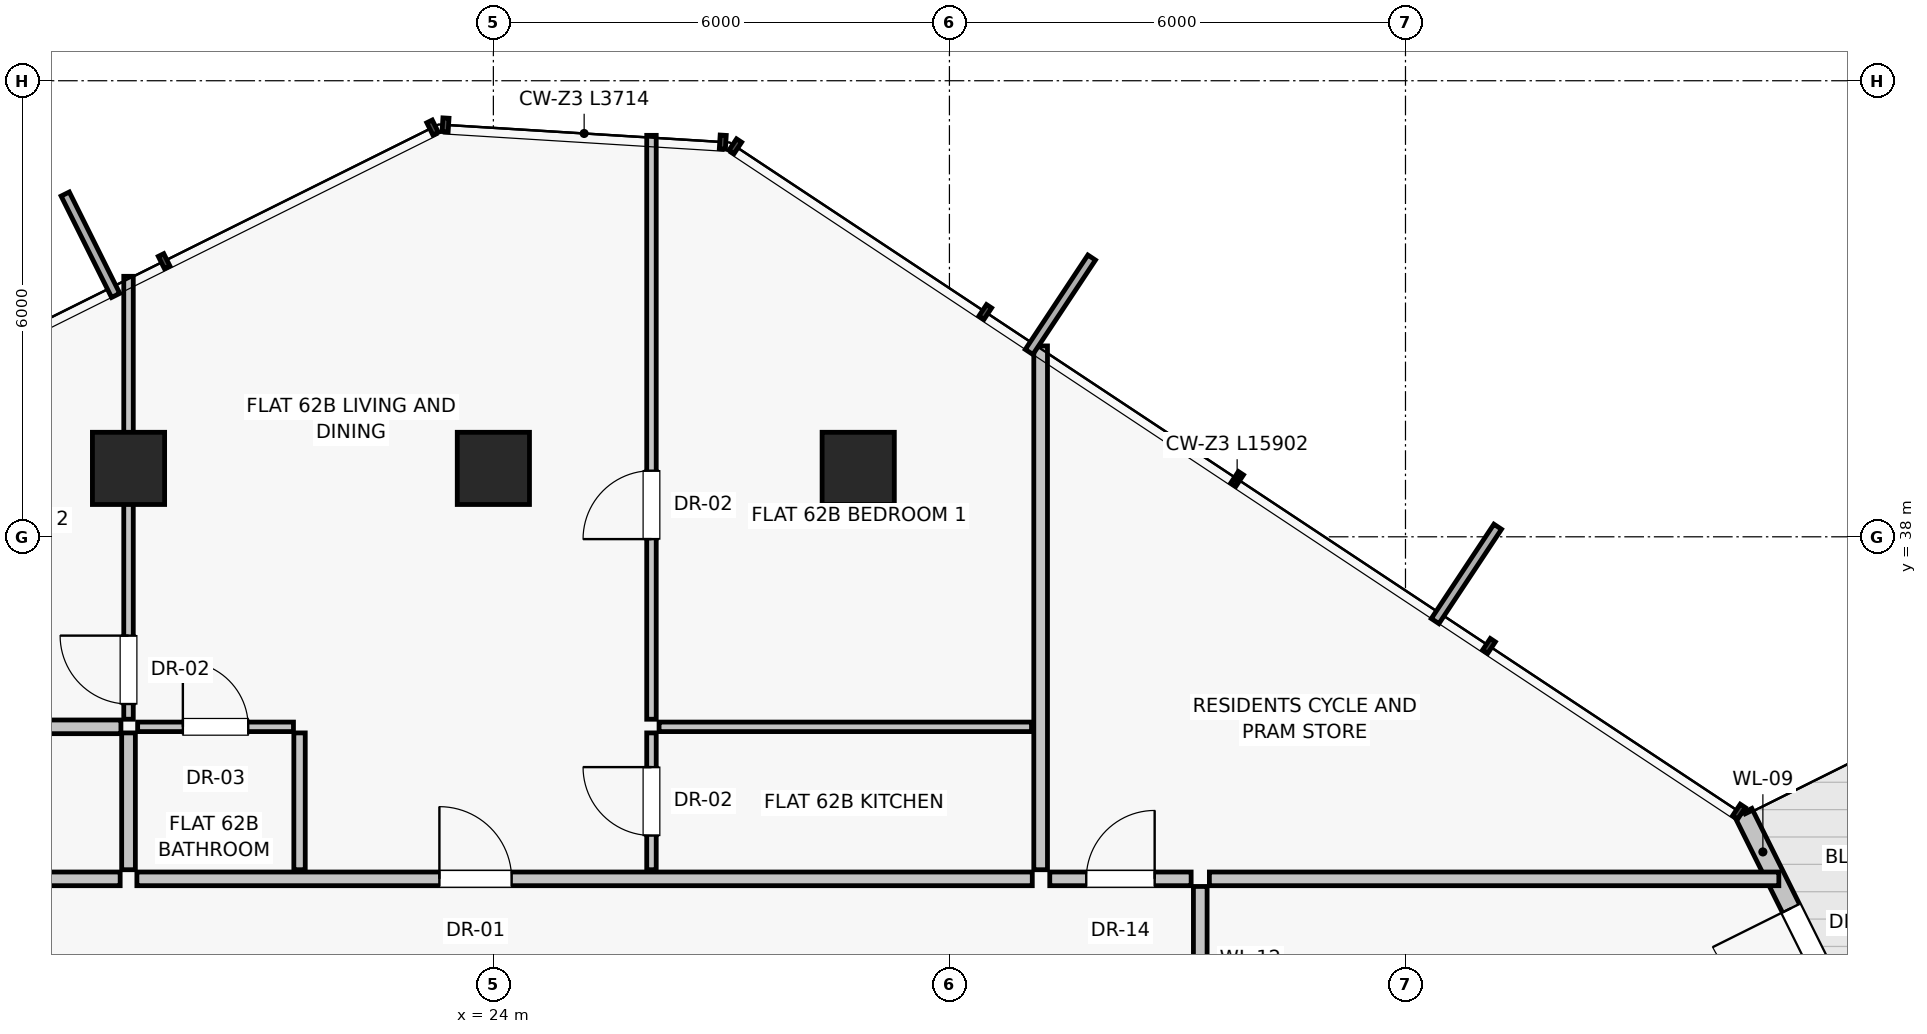
"""IFC4 building model, lengths in metres.
Left out: names, types, materials, properties, quantities, classifications, styles, units other than length and angle.
Written with IfcOpenShell. Run it as: python <this file> out.ifc"""

import sys

from ifc_helpers import new_model, si_unit, direction, frame, frame_2d, origin, origin_2d, place, context, subcontext, project, spatial, rectangle, extrude, source, transform, mapped, element, fill, save


model = new_model("IFC4")
c1 = context("Model", 3, precision=1e-05, world=origin(), true_north=direction((0.0, 1.0)))
c2 = subcontext(c1, "Body", "Model", "MODEL_VIEW")
j1 = project(units=[si_unit("LENGTHUNIT", "METRE"), si_unit("PLANEANGLEUNIT", "RADIAN")], contexts=[c1])
p1 = place(None, origin())
s1 = spatial("IfcSite", under=j1, at=p1, CompositionType="ELEMENT")
p2 = place(p1, origin())
s2 = spatial("IfcBuilding", under=s1, at=p2, CompositionType="ELEMENT")
p3 = place(p2, frame((0.0, 0.0, 218.9)))
s3 = spatial("IfcBuildingStorey", under=s2, at=p3, CompositionType="ELEMENT", Elevation=218.9)
for number, where, z_axis, x_axis in (
    (1, (28.8, 38.9, 0.0), (0.0, 0.0, 1.0), (1.0, 0.0, 0.0)),
    (2, (24.0, 38.9, 0.0), (0.0, 0.0, 1.0), (1.0, 0.0, 0.0)),
    (3, (19.2, 38.9, 0.0), (0.0, 0.0, 1.0), (1.0, 0.0, 0.0)),
):
    element("IfcColumn", number, at=place(p3, frame(where, z_axis=z_axis, x_axis=x_axis)), inside=s3, PredefinedType="COLUMN", context=c2, shape_type="SweptSolid", body=[
        extrude(rectangle(XDim=0.95, YDim=0.95, at=origin_2d()), origin(), (0.0, 0.0, 1.0), 3.25),
    ])
p4 = place(p3, frame((42.189, 30.867, 0.0), z_axis=(0.0, 0.0, 1.0), x_axis=(-0.445591168043, 0.895236567038, 0.0)))
e4 = element("IfcWall", 4, at=p4, inside=s3, PredefinedType="SOLIDWALL", context=c2, shape_type="SweptSolid", body=[
    extrude(rectangle(XDim=3.914, YDim=0.25, at=frame_2d((1.957, 0.0))), origin(), (0.0, 0.0, 1.0), 3.015),
])
p5 = place(p4, frame((1.36, 0.0, 0.0)))
e5 = element("IfcOpeningElement", 5, at=p5, cuts=e4, PredefinedType="OPENING", context=c2, shape_type="SweptSolid", body=[
    extrude(rectangle(XDim=1.15, YDim=2.25, at=frame_2d((0.575, 1.125))), frame((0.0, 0.135, 0.0), z_axis=(0.0, -1.0, 0.0), x_axis=(1.0, 0.0, 0.0)), (0.0, 0.0, 1.0), 0.27),
])
p6 = place(p3, frame((31.2, 33.62, 0.0), z_axis=(0.0, 0.0, 1.0), x_axis=(0.0, 1.0, 0.0)))
e6 = element("IfcWall", 6, at=p6, inside=s3, PredefinedType="PARTITIONING", context=c2, shape_type="SweptSolid", body=[
    extrude(rectangle(XDim=6.891, YDim=0.18, at=frame_2d((3.446, 0.0))), origin(), (0.0, 0.0, 1.0), 3.015),
])
p7 = place(p3, frame((15.31, 33.5, 0.0), z_axis=(0.0, 0.0, 1.0), x_axis=(1.0, 0.0, 0.0)))
e7 = element("IfcWall", 7, at=p7, inside=s3, PredefinedType="PARTITIONING", context=c2, shape_type="SweptSolid", body=[
    extrude(rectangle(XDim=3.78, YDim=0.18, at=frame_2d((1.89, 0.0))), origin(), (0.0, 0.0, 1.0), 3.015),
])
p8 = place(p7, frame((1.39, 0.0, 0.0)))
e8 = element("IfcOpeningElement", 8, at=p8, cuts=e7, PredefinedType="OPENING", context=c2, shape_type="SweptSolid", body=[
    extrude(rectangle(XDim=1.0, YDim=2.01, at=frame_2d((0.5, 1.005))), frame((0.0, 0.1, 0.0), z_axis=(0.0, -1.0, 0.0), x_axis=(1.0, 0.0, 0.0)), (0.0, 0.0, 1.0), 0.2),
])
p9 = place(p3, frame((19.31, 33.5, 0.0), z_axis=(0.0, 0.0, 1.0), x_axis=(1.0, 0.0, 0.0)))
e9 = element("IfcWall", 9, at=p9, inside=s3, PredefinedType="PARTITIONING", context=c2, shape_type="SweptSolid", body=[
    extrude(rectangle(XDim=11.78, YDim=0.18, at=frame_2d((5.89, 0.0))), origin(), (0.0, 0.0, 1.0), 3.015),
])
p10 = place(p9, frame((3.98, 0.0, 0.0)))
e10 = element("IfcOpeningElement", 10, at=p10, cuts=e9, PredefinedType="OPENING", context=c2, shape_type="SweptSolid", body=[
    extrude(rectangle(XDim=0.95, YDim=2.02, at=frame_2d((0.475, 1.01))), frame((0.0, 0.1, 0.0), z_axis=(0.0, -1.0, 0.0), x_axis=(1.0, 0.0, 0.0)), (0.0, 0.0, 1.0), 0.2),
])
p11 = place(p3, frame((15.32, 35.5, 0.0), z_axis=(0.0, 0.0, 1.0), x_axis=(1.0, 0.0, 0.0)))
e11 = element("IfcWall", 11, at=p11, inside=s3, PredefinedType="PARTITIONING", context=c2, shape_type="SweptSolid", body=[
    extrude(rectangle(XDim=3.78, YDim=0.18, at=frame_2d((1.89, 0.0))), origin(), (0.0, 0.0, 1.0), 3.015),
])
p12 = place(p3, frame((19.2, 33.62, 0.0), z_axis=(0.0, 0.0, 1.0), x_axis=(0.0, 1.0, 0.0)))
e12 = element("IfcWall", 12, at=p12, inside=s3, PredefinedType="PARTITIONING", context=c2, shape_type="SweptSolid", body=[
    extrude(rectangle(XDim=1.8, YDim=0.18, at=frame_2d((0.9, 0.0))), origin(), (0.0, 0.0, 1.0), 3.015),
])
p13 = place(p3, frame((19.2, 35.6, 0.0), z_axis=(0.0, 0.0, 1.0), x_axis=(0.0, 1.0, 0.0)))
e13 = element("IfcWall", 13, at=p13, inside=s3, PredefinedType="PARTITIONING", context=c2, shape_type="SweptSolid", body=[
    extrude(rectangle(XDim=5.827, YDim=0.125, at=frame_2d((2.914, 0.0))), origin(), (0.0, 0.0, 1.0), 2.469),
])
p14 = place(p13, frame((0.2, 0.0, 0.0)))
e14 = element("IfcOpeningElement", 14, at=p14, cuts=e13, PredefinedType="OPENING", context=c2, shape_type="SweptSolid", body=[
    extrude(rectangle(XDim=0.9, YDim=2.01, at=frame_2d((0.45, 1.005))), frame((0.0, 0.073, 0.0), z_axis=(0.0, -1.0, 0.0), x_axis=(1.0, 0.0, 0.0)), (0.0, 0.0, 1.0), 0.145),
])
p15 = place(p3, frame((21.45, 33.62, 0.0), z_axis=(0.0, 0.0, 1.0), x_axis=(0.0, 1.0, 0.0)))
e15 = element("IfcWall", 15, at=p15, inside=s3, PredefinedType="PARTITIONING", context=c2, shape_type="SweptSolid", body=[
    extrude(rectangle(XDim=1.8, YDim=0.15, at=frame_2d((0.9, 0.0))), origin(), (0.0, 0.0, 1.0), 3.015),
])
p16 = place(p3, frame((19.32, 35.5, 0.0), z_axis=(0.0, 0.0, 1.0), x_axis=(1.0, 0.0, 0.0)))
e16 = element("IfcWall", 16, at=p16, inside=s3, PredefinedType="PARTITIONING", context=c2, shape_type="SweptSolid", body=[
    extrude(rectangle(XDim=2.05, YDim=0.125, at=frame_2d((1.025, 0.0))), origin(), (0.0, 0.0, 1.0), 2.662),
])
p17 = place(p16, frame((0.595, 0.0, 0.0)))
e17 = element("IfcOpeningElement", 17, at=p17, cuts=e16, PredefinedType="OPENING", context=c2, shape_type="SweptSolid", body=[
    extrude(rectangle(XDim=0.86, YDim=2.01, at=frame_2d((0.43, 1.005))), frame((0.0, 0.073, 0.0), z_axis=(0.0, -1.0, 0.0), x_axis=(1.0, 0.0, 0.0)), (0.0, 0.0, 1.0), 0.145),
])
p18 = place(p3, frame((26.08, 33.62, 0.0), z_axis=(0.0, 0.0, 1.0), x_axis=(0.0, 1.0, 0.0)))
e18 = element("IfcWall", 18, at=p18, inside=s3, PredefinedType="PARTITIONING", context=c2, shape_type="SweptSolid", body=[
    extrude(rectangle(XDim=1.8, YDim=0.125, at=frame_2d((0.9, 0.0))), origin(), (0.0, 0.0, 1.0), 3.015),
])
p19 = place(p18, frame((0.45, 0.0, 0.0)))
e19 = element("IfcOpeningElement", 19, at=p19, cuts=e18, PredefinedType="OPENING", context=c2, shape_type="SweptSolid", body=[
    extrude(rectangle(XDim=0.9, YDim=2.01, at=frame_2d((0.45, 1.005))), frame((0.0, 0.073, 0.0), z_axis=(0.0, -1.0, 0.0), x_axis=(1.0, 0.0, 0.0)), (0.0, 0.0, 1.0), 0.145),
])
p20 = place(p3, frame((26.18, 35.5, 0.0), z_axis=(0.0, 0.0, 1.0), x_axis=(1.0, 0.0, 0.0)))
e20 = element("IfcWall", 20, at=p20, inside=s3, PredefinedType="PARTITIONING", context=c2, shape_type="SweptSolid", body=[
    extrude(rectangle(XDim=4.9, YDim=0.125, at=frame_2d((2.45, 0.0))), origin(), (0.0, 0.0, 1.0), 2.662),
])
p21 = place(p3, frame((26.08, 35.6, 0.0), z_axis=(0.0, 0.0, 1.0), x_axis=(0.0, 1.0, 0.0)))
e21 = element("IfcWall", 21, at=p21, inside=s3, PredefinedType="PARTITIONING", context=c2, shape_type="SweptSolid", body=[
    extrude(rectangle(XDim=7.681, YDim=0.125, at=frame_2d((3.841, 0.0))), origin(), (0.0, 0.0, 1.0), 3.015),
])
p22 = place(p21, frame((2.37, 0.0, 0.0)))
e22 = element("IfcOpeningElement", 22, at=p22, cuts=e21, PredefinedType="OPENING", context=c2, shape_type="SweptSolid", body=[
    extrude(rectangle(XDim=0.9, YDim=2.01, at=frame_2d((0.45, 1.005))), frame((0.0, 0.073, 0.0), z_axis=(0.0, -1.0, 0.0), x_axis=(1.0, 0.0, 0.0)), (0.0, 0.0, 1.0), 0.145),
])
p23 = place(p3, frame((33.3, 31.5, 0.0), z_axis=(0.0, 0.0, 1.0), x_axis=(0.0, 1.0, 0.0)))
e23 = element("IfcWall", 23, at=p23, inside=s3, PredefinedType="PARTITIONING", context=c2, shape_type="SweptSolid", body=[
    extrude(rectangle(XDim=1.9, YDim=0.18, at=frame_2d((0.95, 0.0))), origin(), (0.0, 0.0, 1.0), 3.015),
])
p24 = place(p3, frame((33.42, 33.5, 0.0), z_axis=(0.0, 0.0, 1.0), x_axis=(1.0, 0.0, 0.0)))
e24 = element("IfcWall", 24, at=p24, inside=s3, PredefinedType="PARTITIONING", context=c2, shape_type="SweptSolid", body=[
    extrude(rectangle(XDim=7.492, YDim=0.18, at=frame_2d((3.746, 0.0))), origin(), (0.0, 0.0, 1.0), 3.015),
])
p25 = place(p3, frame((31.32, 33.5, 0.0), z_axis=(0.0, 0.0, 1.0), x_axis=(1.0, 0.0, 0.0)))
e25 = element("IfcWall", 25, at=p25, inside=s3, PredefinedType="PARTITIONING", context=c2, shape_type="SweptSolid", body=[
    extrude(rectangle(XDim=1.86, YDim=0.18, at=frame_2d((0.93, 0.0))), origin(), (0.0, 0.0, 1.0), 3.015),
])
p26 = place(p25, frame((0.48, 0.0, 0.0)))
e26 = element("IfcOpeningElement", 26, at=p26, cuts=e25, PredefinedType="OPENING", context=c2, shape_type="SweptSolid", body=[
    extrude(rectangle(XDim=0.9, YDim=2.01, at=frame_2d((0.45, 1.005))), frame((0.0, 0.1, 0.0), z_axis=(0.0, -1.0, 0.0), x_axis=(1.0, 0.0, 0.0)), (0.0, 0.0, 1.0), 0.2),
])
m1 = source(origin(), c2, "Body", "SweptSolid", [
    extrude(rectangle(XDim=1.15, YDim=2.25, at=frame_2d((0.575, 1.125))), frame((0.0, 0.025, 0.0), z_axis=(0.0, -1.0, 0.0), x_axis=(1.0, 0.0, 0.0)), (0.0, 0.0, 1.0), 0.05),
])
p27 = place(p5, frame((1.15, 0.0, 0.0), z_axis=(0.0, 0.0, 1.0), x_axis=(-1.0, 0.0, 0.0)))
e27 = element("IfcDoor", 27, at=p27, inside=s3, OperationType="SINGLE_SWING_RIGHT", PredefinedType="DOOR", context=c2, shape_type="MappedRepresentation", body=[
    mapped(m1, transform((0.0, 0.0, 0.0), scale=1.0)),
])
fill(e5, e27)
m2 = source(origin(), c2, "Body", "SweptSolid", [
    extrude(rectangle(XDim=0.95, YDim=2.02, at=frame_2d((0.475, 1.01))), frame((0.0, 0.025, 0.0), z_axis=(0.0, -1.0, 0.0), x_axis=(1.0, 0.0, 0.0)), (0.0, 0.0, 1.0), 0.05),
])
p28 = place(p10, origin())
e28 = element("IfcDoor", 28, at=p28, inside=s3, OperationType="SINGLE_SWING_LEFT", PredefinedType="DOOR", context=c2, shape_type="MappedRepresentation", body=[
    mapped(m2, transform((0.0, 0.0, 0.0), scale=1.0)),
])
fill(e10, e28)
m3 = source(origin(), c2, "Body", "SweptSolid", [
    extrude(rectangle(XDim=0.9, YDim=2.01, at=frame_2d((0.45, 1.005))), frame((0.0, 0.025, 0.0), z_axis=(0.0, -1.0, 0.0), x_axis=(1.0, 0.0, 0.0)), (0.0, 0.0, 1.0), 0.05),
])
p29 = place(p14, origin())
e29 = element("IfcDoor", 29, at=p29, inside=s3, OperationType="SINGLE_SWING_RIGHT", PredefinedType="DOOR", context=c2, shape_type="MappedRepresentation", body=[
    mapped(m3, transform((0.0, 0.0, 0.0), scale=1.0)),
])
fill(e14, e29)
m4 = source(origin(), c2, "Body", "SweptSolid", [
    extrude(rectangle(XDim=0.86, YDim=2.01, at=frame_2d((0.43, 1.005))), frame((0.0, 0.025, 0.0), z_axis=(0.0, -1.0, 0.0), x_axis=(1.0, 0.0, 0.0)), (0.0, 0.0, 1.0), 0.05),
])
p30 = place(p17, origin())
e30 = element("IfcDoor", 30, at=p30, inside=s3, OperationType="SINGLE_SWING_LEFT", PredefinedType="DOOR", context=c2, shape_type="MappedRepresentation", body=[
    mapped(m4, transform((0.0, 0.0, 0.0), scale=1.0)),
])
fill(e17, e30)
p31 = place(p19, origin())
e31 = element("IfcDoor", 31, at=p31, inside=s3, OperationType="SINGLE_SWING_RIGHT", PredefinedType="DOOR", context=c2, shape_type="MappedRepresentation", body=[
    mapped(m3, transform((0.0, 0.0, 0.0), scale=1.0)),
])
fill(e19, e31)
p32 = place(p22, origin())
e32 = element("IfcDoor", 32, at=p32, inside=s3, OperationType="SINGLE_SWING_LEFT", PredefinedType="DOOR", context=c2, shape_type="MappedRepresentation", body=[
    mapped(m3, transform((0.0, 0.0, 0.0), scale=1.0)),
])
fill(e22, e32)
p33 = place(p26, origin())
e33 = element("IfcDoor", 33, at=p33, inside=s3, OperationType="SINGLE_SWING_RIGHT", PredefinedType="DOOR", context=c2, shape_type="MappedRepresentation", body=[
    mapped(m3, transform((0.0, 0.0, 0.0), scale=1.0)),
])
fill(e26, e33)
save(model, sys.argv[1])
